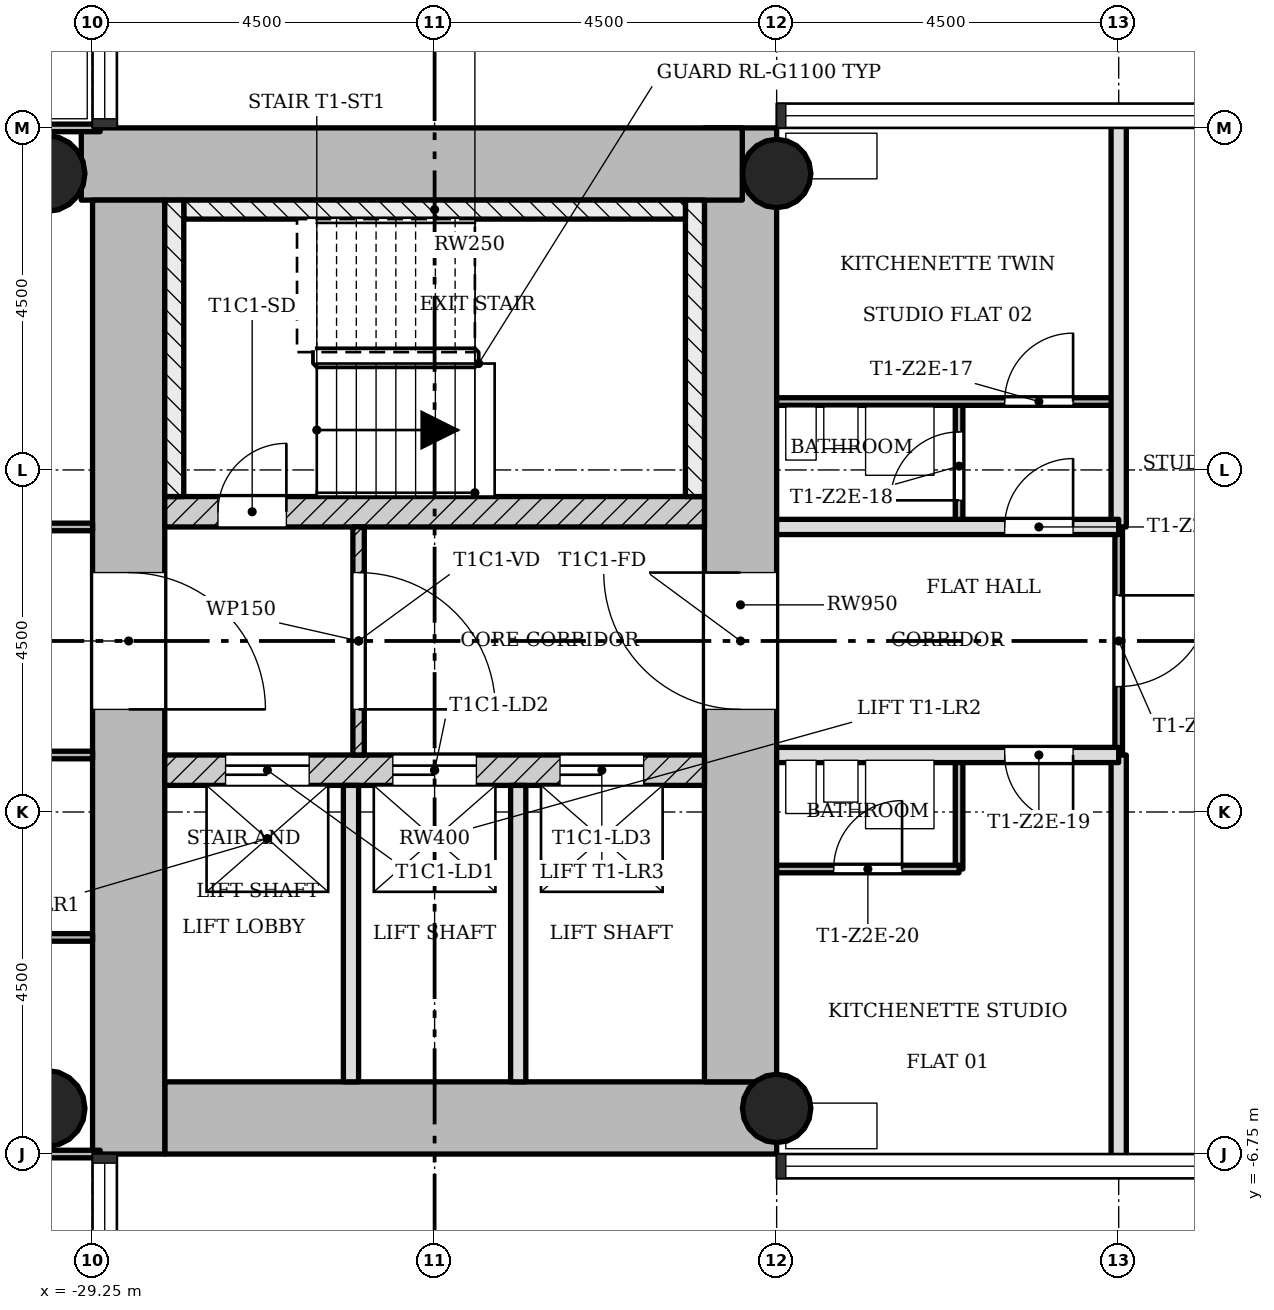
"""IFC4 building model, lengths in metres.
Left out: names, types, materials, properties, quantities, classifications, styles, units other than length and angle.
Written with IfcOpenShell. Run it as: python <this file> out.ifc"""

import sys

from ifc_helpers import new_model, si_unit, direction, frame, frame_2d, origin, origin_2d, place, context, subcontext, project, spatial, rectangle, hollow_circle, extrude, element, fill, save


model = new_model("IFC4")
c1 = context("Model", 3, precision=1e-05, world=origin(), true_north=direction((0.0, 1.0)))
c2 = subcontext(c1, "Body", "Model", "MODEL_VIEW")
j1 = project(units=[si_unit("LENGTHUNIT", "METRE"), si_unit("PLANEANGLEUNIT", "RADIAN")], contexts=[c1])
p1 = place(None, origin())
s1 = spatial("IfcSite", under=j1, at=p1, CompositionType="ELEMENT")
p2 = place(p1, origin())
s2 = spatial("IfcBuilding", under=s1, at=p2, CompositionType="ELEMENT")
p3 = place(p2, frame((0.0, 0.0, 97.0)))
s3 = spatial("IfcBuildingStorey", under=s2, at=p3, CompositionType="ELEMENT", Elevation=97.0)
p4 = place(p3, frame((-28.3, -6.275, 0.0), z_axis=(0.0, 0.0, 1.0), x_axis=(1.0, 0.0, 0.0)))
e1 = element("IfcWall", 1, at=p4, inside=s3, PredefinedType="SHEAR", context=c2, shape_type="SweptSolid", body=[
    extrude(rectangle(XDim=8.05, YDim=0.95, at=frame_2d((4.025, 0.0))), origin(), (0.0, 0.0, 1.0), 3.4),
])
p5 = place(p3, frame((-20.725, -5.8, 0.0), z_axis=(0.0, 0.0, 1.0), x_axis=(0.0, 1.0, 0.0)))
e2 = element("IfcWall", 2, at=p5, inside=s3, PredefinedType="SHEAR", context=c2, shape_type="SweptSolid", body=[
    extrude(rectangle(XDim=12.55, YDim=0.95, at=frame_2d((6.275, 0.0))), origin(), (0.0, 0.0, 1.0), 3.4),
])
p6 = place(p5, frame((4.9, 0.0, 0.0)))
e3 = element("IfcOpeningElement", 3, at=p6, cuts=e2, PredefinedType="OPENING", context=c2, shape_type="SweptSolid", body=[
    extrude(rectangle(XDim=1.8, YDim=2.1, at=frame_2d((0.9, 1.05))), frame((0.0, 0.485, 0.0), z_axis=(0.0, -1.0, 0.0), x_axis=(1.0, 0.0, 0.0)), (0.0, 0.0, 1.0), 0.97),
])
p7 = place(p3, frame((-20.702, 6.275, 0.0), z_axis=(0.0, 0.0, 1.0), x_axis=(-1.0, 0.0, 0.0)))
e4 = element("IfcWall", 4, at=p7, inside=s3, PredefinedType="SHEAR", context=c2, shape_type="SweptSolid", body=[
    extrude(rectangle(XDim=8.696, YDim=0.95, at=frame_2d((4.348, 0.0))), origin(), (0.0, 0.0, 1.0), 3.4),
])
p8 = place(p3, frame((-28.775, 5.8, 0.0), z_axis=(0.0, 0.0, 1.0), x_axis=(0.0, -1.0, 0.0)))
e5 = element("IfcWall", 5, at=p8, inside=s3, PredefinedType="SHEAR", context=c2, shape_type="SweptSolid", body=[
    extrude(rectangle(XDim=12.55, YDim=0.95, at=frame_2d((6.275, 0.0))), origin(), (0.0, 0.0, 1.0), 3.4),
])
p9 = place(p8, frame((4.9, 0.0, 0.0)))
e6 = element("IfcOpeningElement", 6, at=p9, cuts=e5, PredefinedType="OPENING", context=c2, shape_type="SweptSolid", body=[
    extrude(rectangle(XDim=1.8, YDim=2.1, at=frame_2d((0.9, 1.05))), frame((0.0, 0.485, 0.0), z_axis=(0.0, -1.0, 0.0), x_axis=(1.0, 0.0, 0.0)), (0.0, 0.0, 1.0), 0.97),
])
p10 = place(p3, frame((-28.3, -1.7, 0.0), z_axis=(0.0, 0.0, 1.0), x_axis=(1.0, 0.0, 0.0)))
e7 = element("IfcWall", 7, at=p10, inside=s3, PredefinedType="SHEAR", context=c2, shape_type="SweptSolid", body=[
    extrude(rectangle(XDim=7.1, YDim=0.4, at=frame_2d((3.55, 0.0))), origin(), (0.0, 0.0, 1.0), 3.4),
])
p11 = place(p10, frame((0.8, 0.0, 0.0)))
e8 = element("IfcOpeningElement", 8, at=p11, cuts=e7, PredefinedType="OPENING", context=c2, shape_type="SweptSolid", body=[
    extrude(rectangle(XDim=1.1, YDim=2.1, at=frame_2d((0.55, 1.05))), frame((0.0, 0.21, 0.0), z_axis=(0.0, -1.0, 0.0), x_axis=(1.0, 0.0, 0.0)), (0.0, 0.0, 1.0), 0.42),
])
p12 = place(p10, frame((3.0, 0.0, 0.0)))
e9 = element("IfcOpeningElement", 9, at=p12, cuts=e7, PredefinedType="OPENING", context=c2, shape_type="SweptSolid", body=[
    extrude(rectangle(XDim=1.1, YDim=2.1, at=frame_2d((0.55, 1.05))), frame((0.0, 0.21, 0.0), z_axis=(0.0, -1.0, 0.0), x_axis=(1.0, 0.0, 0.0)), (0.0, 0.0, 1.0), 0.42),
])
p13 = place(p10, frame((5.2, 0.0, 0.0)))
e10 = element("IfcOpeningElement", 10, at=p13, cuts=e7, PredefinedType="OPENING", context=c2, shape_type="SweptSolid", body=[
    extrude(rectangle(XDim=1.1, YDim=2.1, at=frame_2d((0.55, 1.05))), frame((0.0, 0.21, 0.0), z_axis=(0.0, -1.0, 0.0), x_axis=(1.0, 0.0, 0.0)), (0.0, 0.0, 1.0), 0.42),
])
p14 = place(p3, frame((-28.3, 1.7, 0.0), z_axis=(0.0, 0.0, 1.0), x_axis=(1.0, 0.0, 0.0)))
e11 = element("IfcWall", 11, at=p14, inside=s3, PredefinedType="SHEAR", context=c2, shape_type="SweptSolid", body=[
    extrude(rectangle(XDim=7.1, YDim=0.4, at=frame_2d((3.55, 0.0))), origin(), (0.0, 0.0, 1.0), 3.4),
])
p15 = place(p14, frame((0.7, 0.0, 0.0)))
e12 = element("IfcOpeningElement", 12, at=p15, cuts=e11, PredefinedType="OPENING", context=c2, shape_type="SweptSolid", body=[
    extrude(rectangle(XDim=0.9, YDim=2.1, at=frame_2d((0.45, 1.05))), frame((0.0, 0.21, 0.0), z_axis=(0.0, -1.0, 0.0), x_axis=(1.0, 0.0, 0.0)), (0.0, 0.0, 1.0), 0.42),
])
for number, where, z_axis, x_axis in (
    (13, (-20.25, -6.15, 0.0), (0.0, 0.0, 1.0), (1.0, 0.0, 0.0)),
    (14, (-20.25, 6.15, 0.0), (0.0, 0.0, 1.0), (1.0, 0.0, 0.0)),
):
    element("IfcColumn", number, at=place(p3, frame(where, z_axis=z_axis, x_axis=x_axis)), inside=s3, PredefinedType="COLUMN", context=c2, shape_type="SweptSolid", body=[
        extrude(hollow_circle(Radius=0.45, WallThickness=0.032, at=origin_2d()), origin(), (0.0, 0.0, 1.0), 3.4),
    ])
for number, where, z_axis, x_axis in (
    (15, (-29.85, -6.15, 0.0), (0.0, 0.0, 1.0), (1.0, 0.0, 0.0)),
    (16, (-29.85, 6.15, 0.0), (0.0, 0.0, 1.0), (1.0, 0.0, 0.0)),
):
    element("IfcColumn", number, at=place(p3, frame(where, z_axis=z_axis, x_axis=x_axis)), inside=s3, PredefinedType="COLUMN", context=c2, shape_type="SweptSolid", body=[
        extrude(hollow_circle(Radius=0.5, WallThickness=0.036, at=origin_2d()), origin(), (0.0, 0.0, 1.0), 3.4),
    ])
p16 = place(p3, frame((-25.75, -1.5, 0.0), z_axis=(0.0, 0.0, 1.0), x_axis=(0.0, 1.0, 0.0)))
e17 = element("IfcWall", 17, at=p16, inside=s3, PredefinedType="PARTITIONING", context=c2, shape_type="SweptSolid", body=[
    extrude(rectangle(XDim=3.0, YDim=0.15, at=frame_2d((1.5, 0.0))), origin(), (0.0, 0.0, 1.0), 3.0),
])
p17 = place(p16, frame((0.6, 0.0, 0.0)))
e18 = element("IfcOpeningElement", 18, at=p17, cuts=e17, PredefinedType="OPENING", context=c2, shape_type="SweptSolid", body=[
    extrude(rectangle(XDim=1.8, YDim=2.1, at=frame_2d((0.9, 1.05))), frame((0.0, 0.085, 0.0), z_axis=(0.0, -1.0, 0.0), x_axis=(1.0, 0.0, 0.0)), (0.0, 0.0, 1.0), 0.17),
])
for number, where, z_axis, x_axis in (
    (19, (-25.85, -5.8, 0.0), (0.0, 0.0, 1.0), (0.0, 1.0, 0.0)),
    (20, (-23.65, -5.8, 0.0), (0.0, 0.0, 1.0), (0.0, 1.0, 0.0)),
):
    element("IfcWall", number, at=place(p3, frame(where, z_axis=z_axis, x_axis=x_axis)), inside=s3, PredefinedType="SOLIDWALL", context=c2, shape_type="SweptSolid", body=[
        extrude(rectangle(XDim=3.9, YDim=0.2, at=frame_2d((1.95, 0.0))), origin(), (0.0, 0.0, 1.0), 3.0),
    ])
p18 = place(p3, frame((-17.85, -3.0, 0.0), z_axis=(0.0, 0.0, 1.0), x_axis=(0.0, 1.0, 0.0)))
e21 = element("IfcWall", 21, at=p18, inside=s3, PredefinedType="PARTITIONING", context=c2, shape_type="SweptSolid", body=[
    extrude(rectangle(XDim=1.5, YDim=0.1, at=frame_2d((0.75, 0.0))), origin(), (0.0, 0.0, 1.0), 3.0),
])
p19 = place(p3, frame((-17.85, 1.5, 0.0), z_axis=(0.0, 0.0, 1.0), x_axis=(0.0, 1.0, 0.0)))
e22 = element("IfcWall", 22, at=p19, inside=s3, PredefinedType="PARTITIONING", context=c2, shape_type="SweptSolid", body=[
    extrude(rectangle(XDim=1.65, YDim=0.1, at=frame_2d((0.825, 0.0))), origin(), (0.0, 0.0, 1.0), 3.0),
])
p20 = place(p19, frame((0.35, 0.0, 0.0)))
e23 = element("IfcOpeningElement", 23, at=p20, cuts=e22, PredefinedType="OPENING", context=c2, shape_type="SweptSolid", body=[
    extrude(rectangle(XDim=0.9, YDim=2.1, at=frame_2d((0.45, 1.05))), frame((0.0, 0.06, 0.0), z_axis=(0.0, -1.0, 0.0), x_axis=(1.0, 0.0, 0.0)), (0.0, 0.0, 1.0), 0.12),
])
p21 = place(p3, frame((-15.75, -1.5, 0.0), z_axis=(0.0, 0.0, 1.0), x_axis=(0.0, 1.0, 0.0)))
e24 = element("IfcWall", 24, at=p21, inside=s3, PredefinedType="PARTITIONING", context=c2, shape_type="SweptSolid", body=[
    extrude(rectangle(XDim=3.0, YDim=0.1, at=frame_2d((1.5, 0.0))), origin(), (0.0, 0.0, 1.0), 3.0),
])
p22 = place(p21, frame((0.9, 0.0, 0.0)))
e25 = element("IfcOpeningElement", 25, at=p22, cuts=e24, PredefinedType="OPENING", context=c2, shape_type="SweptSolid", body=[
    extrude(rectangle(XDim=1.2, YDim=2.1, at=frame_2d((0.6, 1.05))), frame((0.0, 0.06, 0.0), z_axis=(0.0, -1.0, 0.0), x_axis=(1.0, 0.0, 0.0)), (0.0, 0.0, 1.0), 0.12),
])
for number, where, z_axis, x_axis in (
    (26, (-15.75, -6.85, 0.0), (0.0, 0.0, 1.0), (0.0, 1.0, 0.0)),
    (27, (-15.75, 1.5, 0.0), (0.0, 0.0, 1.0), (0.0, 1.0, 0.0)),
):
    element("IfcWall", number, at=place(p3, frame(where, z_axis=z_axis, x_axis=x_axis)), inside=s3, PredefinedType="SOLIDWALL", context=c2, shape_type="SweptSolid", body=[
        extrude(rectangle(XDim=5.35, YDim=0.2, at=frame_2d((2.675, 0.0))), origin(), (0.0, 0.0, 1.0), 3.0),
    ])
p23 = place(p3, frame((-35.1, -6.75, 0.0), z_axis=(0.0, 0.0, 1.0), x_axis=(1.0, 0.0, 0.0)))
e28 = element("IfcWall", 28, at=p23, inside=s3, PredefinedType="PARTITIONING", context=c2, shape_type="SweptSolid", body=[
    extrude(rectangle(XDim=5.95, YDim=0.1, at=frame_2d((2.975, 0.0))), origin(), (0.0, 0.0, 1.0), 3.0),
])
p24 = place(p3, frame((-35.1, -3.9, 0.0), z_axis=(0.0, 0.0, 1.0), x_axis=(1.0, 0.0, 0.0)))
e29 = element("IfcWall", 29, at=p24, inside=s3, PredefinedType="PARTITIONING", context=c2, shape_type="SweptSolid", body=[
    extrude(rectangle(XDim=5.85, YDim=0.1, at=frame_2d((2.925, 0.0))), origin(), (0.0, 0.0, 1.0), 3.0),
])
p25 = place(p3, frame((-20.25, -3.0, 0.0), z_axis=(0.0, 0.0, 1.0), x_axis=(1.0, 0.0, 0.0)))
e30 = element("IfcWall", 30, at=p25, inside=s3, PredefinedType="PARTITIONING", context=c2, shape_type="SweptSolid", body=[
    extrude(rectangle(XDim=2.4, YDim=0.1, at=frame_2d((1.2, 0.0))), origin(), (0.0, 0.0, 1.0), 3.0),
])
p26 = place(p25, frame((0.75, 0.0, 0.0)))
e31 = element("IfcOpeningElement", 31, at=p26, cuts=e30, PredefinedType="OPENING", context=c2, shape_type="SweptSolid", body=[
    extrude(rectangle(XDim=0.9, YDim=2.1, at=frame_2d((0.45, 1.05))), frame((0.0, 0.06, 0.0), z_axis=(0.0, -1.0, 0.0), x_axis=(1.0, 0.0, 0.0)), (0.0, 0.0, 1.0), 0.12),
])
p27 = place(p3, frame((-35.1, -1.5, 0.0), z_axis=(0.0, 0.0, 1.0), x_axis=(1.0, 0.0, 0.0)))
e32 = element("IfcWall", 32, at=p27, inside=s3, PredefinedType="PARTITIONING", context=c2, shape_type="SweptSolid", body=[
    extrude(rectangle(XDim=5.85, YDim=0.1, at=frame_2d((2.925, 0.0))), origin(), (0.0, 0.0, 1.0), 3.0),
])
p28 = place(p27, frame((3.375, 0.0, 0.0)))
e33 = element("IfcOpeningElement", 33, at=p28, cuts=e32, PredefinedType="OPENING", context=c2, shape_type="SweptSolid", body=[
    extrude(rectangle(XDim=0.9, YDim=2.1, at=frame_2d((0.45, 1.05))), frame((0.0, 0.06, 0.0), z_axis=(0.0, -1.0, 0.0), x_axis=(1.0, 0.0, 0.0)), (0.0, 0.0, 1.0), 0.12),
])
p29 = place(p3, frame((-20.25, -1.5, 0.0), z_axis=(0.0, 0.0, 1.0), x_axis=(1.0, 0.0, 0.0)))
e34 = element("IfcWall", 34, at=p29, inside=s3, PredefinedType="SOLIDWALL", context=c2, shape_type="SweptSolid", body=[
    extrude(rectangle(XDim=4.5, YDim=0.2, at=frame_2d((2.25, 0.0))), origin(), (0.0, 0.0, 1.0), 3.0),
])
p30 = place(p29, frame((3.0, 0.0, 0.0)))
e35 = element("IfcOpeningElement", 35, at=p30, cuts=e34, PredefinedType="OPENING", context=c2, shape_type="SweptSolid", body=[
    extrude(rectangle(XDim=0.9, YDim=2.1, at=frame_2d((0.45, 1.05))), frame((0.0, 0.11, 0.0), z_axis=(0.0, -1.0, 0.0), x_axis=(1.0, 0.0, 0.0)), (0.0, 0.0, 1.0), 0.22),
])
p31 = place(p3, frame((-35.1, 1.5, 0.0), z_axis=(0.0, 0.0, 1.0), x_axis=(1.0, 0.0, 0.0)))
e36 = element("IfcWall", 36, at=p31, inside=s3, PredefinedType="PARTITIONING", context=c2, shape_type="SweptSolid", body=[
    extrude(rectangle(XDim=5.85, YDim=0.1, at=frame_2d((2.925, 0.0))), origin(), (0.0, 0.0, 1.0), 3.0),
])
p32 = place(p31, frame((3.675, 0.0, 0.0)))
e37 = element("IfcOpeningElement", 37, at=p32, cuts=e36, PredefinedType="OPENING", context=c2, shape_type="SweptSolid", body=[
    extrude(rectangle(XDim=0.9, YDim=2.1, at=frame_2d((0.45, 1.05))), frame((0.0, 0.06, 0.0), z_axis=(0.0, -1.0, 0.0), x_axis=(1.0, 0.0, 0.0)), (0.0, 0.0, 1.0), 0.12),
])
p33 = place(p3, frame((-20.25, 1.5, 0.0), z_axis=(0.0, 0.0, 1.0), x_axis=(1.0, 0.0, 0.0)))
e38 = element("IfcWall", 38, at=p33, inside=s3, PredefinedType="SOLIDWALL", context=c2, shape_type="SweptSolid", body=[
    extrude(rectangle(XDim=4.5, YDim=0.2, at=frame_2d((2.25, 0.0))), origin(), (0.0, 0.0, 1.0), 3.0),
])
p34 = place(p33, frame((3.0, 0.0, 0.0)))
e39 = element("IfcOpeningElement", 39, at=p34, cuts=e38, PredefinedType="OPENING", context=c2, shape_type="SweptSolid", body=[
    extrude(rectangle(XDim=0.9, YDim=2.1, at=frame_2d((0.45, 1.05))), frame((0.0, 0.11, 0.0), z_axis=(0.0, -1.0, 0.0), x_axis=(1.0, 0.0, 0.0)), (0.0, 0.0, 1.0), 0.22),
])
p35 = place(p3, frame((-20.25, 3.15, 0.0), z_axis=(0.0, 0.0, 1.0), x_axis=(1.0, 0.0, 0.0)))
e40 = element("IfcWall", 40, at=p35, inside=s3, PredefinedType="PARTITIONING", context=c2, shape_type="SweptSolid", body=[
    extrude(rectangle(XDim=4.5, YDim=0.1, at=frame_2d((2.25, 0.0))), origin(), (0.0, 0.0, 1.0), 3.0),
])
p36 = place(p35, frame((3.0, 0.0, 0.0)))
e41 = element("IfcOpeningElement", 41, at=p36, cuts=e40, PredefinedType="OPENING", context=c2, shape_type="SweptSolid", body=[
    extrude(rectangle(XDim=0.9, YDim=2.1, at=frame_2d((0.45, 1.05))), frame((0.0, 0.06, 0.0), z_axis=(0.0, -1.0, 0.0), x_axis=(1.0, 0.0, 0.0)), (0.0, 0.0, 1.0), 0.12),
])
p37 = place(p3, frame((-35.1, 6.75, 0.0), z_axis=(0.0, 0.0, 1.0), x_axis=(1.0, 0.0, 0.0)))
e42 = element("IfcWall", 42, at=p37, inside=s3, PredefinedType="PARTITIONING", context=c2, shape_type="SweptSolid", body=[
    extrude(rectangle(XDim=5.95, YDim=0.1, at=frame_2d((2.975, 0.0))), origin(), (0.0, 0.0, 1.0), 3.0),
])
p38 = place(p3, frame((-21.325, 1.9, 0.0), z_axis=(0.0, 0.0, 1.0), x_axis=(0.0, 1.0, 0.0)))
e43 = element("IfcWall", 43, at=p38, inside=s3, PredefinedType="SHEAR", context=c2, shape_type="SweptSolid", body=[
    extrude(rectangle(XDim=3.9, YDim=0.25, at=frame_2d((1.95, 0.0))), origin(), (0.0, 0.0, 1.0), 3.4),
])
p39 = place(p3, frame((-28.05, 5.675, 0.0), z_axis=(0.0, 0.0, 1.0), x_axis=(1.0, 0.0, 0.0)))
e44 = element("IfcWall", 44, at=p39, inside=s3, PredefinedType="SHEAR", context=c2, shape_type="SweptSolid", body=[
    extrude(rectangle(XDim=6.6, YDim=0.25, at=frame_2d((3.3, 0.0))), origin(), (0.0, 0.0, 1.0), 3.4),
])
p40 = place(p3, frame((-28.175, 1.9, 0.0), z_axis=(0.0, 0.0, 1.0), x_axis=(0.0, 1.0, 0.0)))
e45 = element("IfcWall", 45, at=p40, inside=s3, PredefinedType="SHEAR", context=c2, shape_type="SweptSolid", body=[
    extrude(rectangle(XDim=3.9, YDim=0.25, at=frame_2d((1.95, 0.0))), origin(), (0.0, 0.0, 1.0), 3.4),
])
p41 = place(p17, origin())
e46 = element("IfcDoor", 46, at=p41, inside=s3, OperationType="SINGLE_SWING_LEFT", PredefinedType="DOOR", context=c2, shape_type="SweptSolid", body=[
    extrude(rectangle(XDim=1.8, YDim=2.1, at=frame_2d((0.9, 1.05))), frame((0.0, 0.025, 0.0), z_axis=(0.0, -1.0, 0.0), x_axis=(1.0, 0.0, 0.0)), (0.0, 0.0, 1.0), 0.05),
])
fill(e18, e46)
p42 = place(p34, origin())
e47 = element("IfcDoor", 47, at=p42, inside=s3, OperationType="SINGLE_SWING_LEFT", PredefinedType="DOOR", context=c2, shape_type="SweptSolid", body=[
    extrude(rectangle(XDim=0.9, YDim=2.1, at=frame_2d((0.45, 1.05))), frame((0.0, 0.025, 0.0), z_axis=(0.0, -1.0, 0.0), x_axis=(1.0, 0.0, 0.0)), (0.0, 0.0, 1.0), 0.05),
])
fill(e39, e47)
p43 = place(p36, origin())
e48 = element("IfcDoor", 48, at=p43, inside=s3, OperationType="SINGLE_SWING_LEFT", PredefinedType="DOOR", context=c2, shape_type="SweptSolid", body=[
    extrude(rectangle(XDim=0.9, YDim=2.1, at=frame_2d((0.45, 1.05))), frame((0.0, 0.025, 0.0), z_axis=(0.0, -1.0, 0.0), x_axis=(1.0, 0.0, 0.0)), (0.0, 0.0, 1.0), 0.05),
])
fill(e41, e48)
p44 = place(p20, origin())
e49 = element("IfcDoor", 49, at=p44, inside=s3, OperationType="SINGLE_SWING_RIGHT", PredefinedType="DOOR", context=c2, shape_type="SweptSolid", body=[
    extrude(rectangle(XDim=0.9, YDim=2.1, at=frame_2d((0.45, 1.05))), frame((0.0, 0.025, 0.0), z_axis=(0.0, -1.0, 0.0), x_axis=(1.0, 0.0, 0.0)), (0.0, 0.0, 1.0), 0.05),
])
fill(e23, e49)
p45 = place(p30, origin())
e50 = element("IfcDoor", 50, at=p45, inside=s3, OperationType="SINGLE_SWING_RIGHT", PredefinedType="DOOR", context=c2, shape_type="SweptSolid", body=[
    extrude(rectangle(XDim=0.9, YDim=2.1, at=frame_2d((0.45, 1.05))), frame((0.0, 0.025, 0.0), z_axis=(0.0, -1.0, 0.0), x_axis=(1.0, 0.0, 0.0)), (0.0, 0.0, 1.0), 0.05),
])
fill(e35, e50)
p46 = place(p26, origin())
e51 = element("IfcDoor", 51, at=p46, inside=s3, OperationType="SINGLE_SWING_LEFT", PredefinedType="DOOR", context=c2, shape_type="SweptSolid", body=[
    extrude(rectangle(XDim=0.9, YDim=2.1, at=frame_2d((0.45, 1.05))), frame((0.0, 0.025, 0.0), z_axis=(0.0, -1.0, 0.0), x_axis=(1.0, 0.0, 0.0)), (0.0, 0.0, 1.0), 0.05),
])
fill(e31, e51)
p47 = place(p22, origin())
e52 = element("IfcDoor", 52, at=p47, inside=s3, OperationType="SINGLE_SWING_RIGHT", PredefinedType="DOOR", context=c2, shape_type="SweptSolid", body=[
    extrude(rectangle(XDim=1.2, YDim=2.1, at=frame_2d((0.6, 1.05))), frame((0.0, 0.025, 0.0), z_axis=(0.0, -1.0, 0.0), x_axis=(1.0, 0.0, 0.0)), (0.0, 0.0, 1.0), 0.05),
])
fill(e25, e52)
p48 = place(p15, origin())
e53 = element("IfcDoor", 53, at=p48, inside=s3, OperationType="SINGLE_SWING_LEFT", PredefinedType="DOOR", context=c2, shape_type="SweptSolid", body=[
    extrude(rectangle(XDim=0.9, YDim=2.1, at=frame_2d((0.45, 1.05))), frame((0.0, 0.025, 0.0), z_axis=(0.0, -1.0, 0.0), x_axis=(1.0, 0.0, 0.0)), (0.0, 0.0, 1.0), 0.05),
])
fill(e12, e53)
p49 = place(p11, origin())
e54 = element("IfcDoor", 54, at=p49, inside=s3, OperationType="SLIDING_TO_LEFT", PredefinedType="DOOR", context=c2, shape_type="SweptSolid", body=[
    extrude(rectangle(XDim=1.1, YDim=2.1, at=frame_2d((0.55, 1.05))), frame((0.0, 0.025, 0.0), z_axis=(0.0, -1.0, 0.0), x_axis=(1.0, 0.0, 0.0)), (0.0, 0.0, 1.0), 0.05),
])
fill(e8, e54)
p50 = place(p12, origin())
e55 = element("IfcDoor", 55, at=p50, inside=s3, OperationType="SLIDING_TO_LEFT", PredefinedType="DOOR", context=c2, shape_type="SweptSolid", body=[
    extrude(rectangle(XDim=1.1, YDim=2.1, at=frame_2d((0.55, 1.05))), frame((0.0, 0.025, 0.0), z_axis=(0.0, -1.0, 0.0), x_axis=(1.0, 0.0, 0.0)), (0.0, 0.0, 1.0), 0.05),
])
fill(e9, e55)
p51 = place(p13, origin())
e56 = element("IfcDoor", 56, at=p51, inside=s3, OperationType="SLIDING_TO_LEFT", PredefinedType="DOOR", context=c2, shape_type="SweptSolid", body=[
    extrude(rectangle(XDim=1.1, YDim=2.1, at=frame_2d((0.55, 1.05))), frame((0.0, 0.025, 0.0), z_axis=(0.0, -1.0, 0.0), x_axis=(1.0, 0.0, 0.0)), (0.0, 0.0, 1.0), 0.05),
])
fill(e10, e56)
p52 = place(p9, origin())
e57 = element("IfcDoor", 57, at=p52, inside=s3, OperationType="SINGLE_SWING_LEFT", PredefinedType="DOOR", context=c2, shape_type="SweptSolid", body=[
    extrude(rectangle(XDim=1.8, YDim=2.1, at=frame_2d((0.9, 1.05))), frame((0.0, 0.025, 0.0), z_axis=(0.0, -1.0, 0.0), x_axis=(1.0, 0.0, 0.0)), (0.0, 0.0, 1.0), 0.05),
])
fill(e6, e57)
p53 = place(p6, origin())
e58 = element("IfcDoor", 58, at=p53, inside=s3, OperationType="SINGLE_SWING_LEFT", PredefinedType="DOOR", context=c2, shape_type="SweptSolid", body=[
    extrude(rectangle(XDim=1.8, YDim=2.1, at=frame_2d((0.9, 1.05))), frame((0.0, 0.025, 0.0), z_axis=(0.0, -1.0, 0.0), x_axis=(1.0, 0.0, 0.0)), (0.0, 0.0, 1.0), 0.05),
])
fill(e3, e58)
save(model, sys.argv[1])
